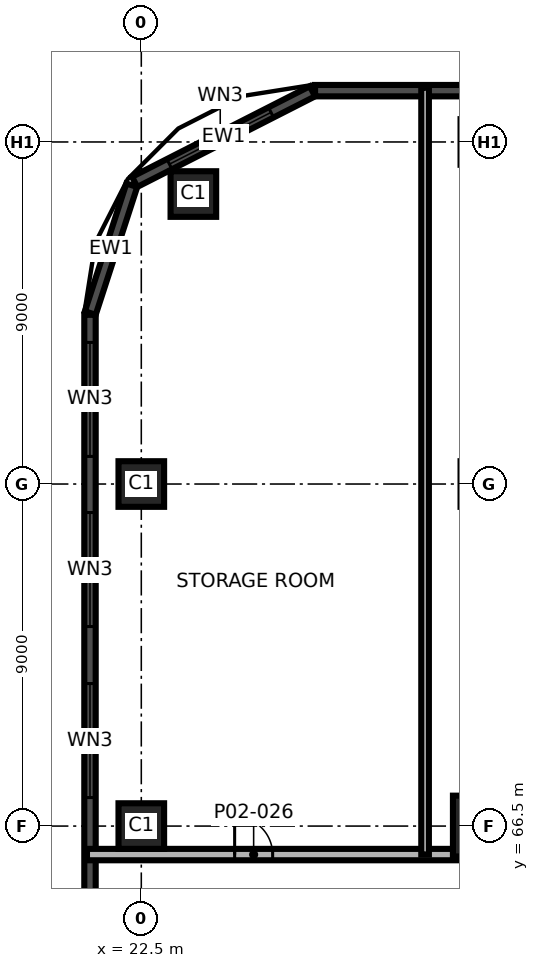
"""IFC4 building model, lengths in metres.
Left out: names, types, materials, properties, quantities, classifications, styles, units other than length and angle.
Written with IfcOpenShell. Run it as: python <this file> out.ifc"""

import sys

from ifc_helpers import new_model, si_unit, direction, frame, frame_2d, origin, origin_2d, place, context, subcontext, project, spatial, rectangle, extrude, element, fill, save


model = new_model("IFC4")
c1 = context("Model", 3, precision=1e-05, world=origin(), true_north=direction((0.0, 1.0)))
c2 = subcontext(c1, "Body", "Model", "MODEL_VIEW")
j1 = project(units=[si_unit("LENGTHUNIT", "METRE"), si_unit("PLANEANGLEUNIT", "RADIAN")], contexts=[c1])
p1 = place(None, origin())
s1 = spatial("IfcSite", under=j1, at=p1, CompositionType="ELEMENT")
p2 = place(p1, origin())
s2 = spatial("IfcBuilding", under=s1, at=p2, CompositionType="ELEMENT")
p3 = place(p2, frame((0.0, 0.0, 13.5)))
s3 = spatial("IfcBuildingStorey", under=s2, at=p3, CompositionType="ELEMENT", Elevation=13.5)
p4 = place(p3, frame((22.5, 66.5, 0.0), z_axis=(0.0, 0.0, 1.0), x_axis=(1.0, 0.0, 0.0)))
e1 = element("IfcColumn", 1, at=p4, inside=s3, PredefinedType="COLUMN", context=c2, shape_type="SweptSolid", body=[
    extrude(rectangle(XDim=1.2, YDim=1.2, at=origin_2d()), origin(), (0.0, 0.0, 1.0), 5.0),
])
p5 = place(p3, frame((31.5, 66.5, 0.0), z_axis=(0.0, 0.0, 1.0), x_axis=(1.0, 0.0, 0.0)))
e2 = element("IfcColumn", 2, at=p5, inside=s3, PredefinedType="COLUMN", context=c2, shape_type="SweptSolid", body=[
    extrude(rectangle(XDim=1.6, YDim=1.6, at=origin_2d()), origin(), (0.0, 0.0, 1.0), 5.0),
])
for number, where, z_axis, x_axis in (
    (3, (22.5, 75.5, 0.0), (0.0, 0.0, 1.0), (1.0, 0.0, 0.0)),
    (4, (23.87, 83.13, 0.0), (0.0, 0.0, 1.0), (1.0, 0.0, 0.0)),
):
    element("IfcColumn", number, at=place(p3, frame(where, z_axis=z_axis, x_axis=x_axis)), inside=s3, PredefinedType="COLUMN", context=c2, shape_type="SweptSolid", body=[
        extrude(rectangle(XDim=1.2, YDim=1.2, at=origin_2d()), origin(), (0.0, 0.0, 1.0), 5.0),
    ])
p6 = place(p3, frame((53.952, 85.85, 0.0), z_axis=(0.0, 0.0, 1.0), x_axis=(-1.0, 0.0, 0.0)))
e5 = element("IfcWall", 5, at=p6, inside=s3, PredefinedType="SOLIDWALL", context=c2, shape_type="SweptSolid", body=[
    extrude(rectangle(XDim=26.88, YDim=0.3, at=frame_2d((13.44, 0.0))), origin(), (0.0, 0.0, 1.0), 4.7),
])
p7 = place(p6, frame((0.726, 0.0, 0.9)))
e6 = element("IfcOpeningElement", 6, at=p7, cuts=e5, PredefinedType="OPENING", context=c2, shape_type="SweptSolid", body=[
    extrude(rectangle(XDim=3.0, YDim=2.4, at=frame_2d((1.5, 1.2))), frame((0.0, 0.16, 0.0), z_axis=(0.0, -1.0, 0.0), x_axis=(1.0, 0.0, 0.0)), (0.0, 0.0, 1.0), 0.32),
])
p8 = place(p6, frame((5.202, 0.0, 0.9)))
e7 = element("IfcOpeningElement", 7, at=p8, cuts=e5, PredefinedType="OPENING", context=c2, shape_type="SweptSolid", body=[
    extrude(rectangle(XDim=3.0, YDim=2.4, at=frame_2d((1.5, 1.2))), frame((0.0, 0.16, 0.0), z_axis=(0.0, -1.0, 0.0), x_axis=(1.0, 0.0, 0.0)), (0.0, 0.0, 1.0), 0.32),
])
p9 = place(p6, frame((9.702, 0.0, 0.9)))
e8 = element("IfcOpeningElement", 8, at=p9, cuts=e5, PredefinedType="OPENING", context=c2, shape_type="SweptSolid", body=[
    extrude(rectangle(XDim=3.0, YDim=2.4, at=frame_2d((1.5, 1.2))), frame((0.0, 0.16, 0.0), z_axis=(0.0, -1.0, 0.0), x_axis=(1.0, 0.0, 0.0)), (0.0, 0.0, 1.0), 0.32),
])
p10 = place(p6, frame((14.202, 0.0, 0.9)))
e9 = element("IfcOpeningElement", 9, at=p10, cuts=e5, PredefinedType="OPENING", context=c2, shape_type="SweptSolid", body=[
    extrude(rectangle(XDim=3.0, YDim=2.4, at=frame_2d((1.5, 1.2))), frame((0.0, 0.16, 0.0), z_axis=(0.0, -1.0, 0.0), x_axis=(1.0, 0.0, 0.0)), (0.0, 0.0, 1.0), 0.32),
])
p11 = place(p6, frame((18.702, 0.0, 0.9)))
e10 = element("IfcOpeningElement", 10, at=p11, cuts=e5, PredefinedType="OPENING", context=c2, shape_type="SweptSolid", body=[
    extrude(rectangle(XDim=3.0, YDim=2.4, at=frame_2d((1.5, 1.2))), frame((0.0, 0.16, 0.0), z_axis=(0.0, -1.0, 0.0), x_axis=(1.0, 0.0, 0.0)), (0.0, 0.0, 1.0), 0.32),
])
p12 = place(p3, frame((27.004, 85.834, 0.0), z_axis=(0.0, 0.0, 1.0), x_axis=(-0.890998339455, -0.454006562826, 0.0)))
e11 = element("IfcWall", 11, at=p12, inside=s3, PredefinedType="SOLIDWALL", context=c2, shape_type="SweptSolid", body=[
    extrude(rectangle(XDim=5.252, YDim=0.3, at=frame_2d((2.626, 0.0))), origin(), (0.0, 0.0, 1.0), 4.7),
])
p13 = place(p12, frame((1.224, 0.0, 0.9)))
e12 = element("IfcOpeningElement", 12, at=p13, cuts=e11, PredefinedType="OPENING", context=c2, shape_type="SweptSolid", body=[
    extrude(rectangle(XDim=3.0, YDim=2.4, at=frame_2d((1.5, 1.2))), frame((0.0, 0.16, 0.0), z_axis=(0.0, -1.0, 0.0), x_axis=(1.0, 0.0, 0.0)), (0.0, 0.0, 1.0), 0.32),
])
p14 = place(p3, frame((22.25, 83.362, 0.0), z_axis=(0.0, 0.0, 1.0), x_axis=(-0.309073584194, -0.951038127287, 0.0)))
e13 = element("IfcWall", 13, at=p14, inside=s3, PredefinedType="SOLIDWALL", context=c2, shape_type="SweptSolid", body=[
    extrude(rectangle(XDim=3.536, YDim=0.3, at=frame_2d((1.768, 0.0))), origin(), (0.0, 0.0, 1.0), 4.7),
])
p15 = place(p3, frame((21.15, 79.952, 0.0), z_axis=(0.0, 0.0, 1.0), x_axis=(0.0, -1.0, 0.0)))
e14 = element("IfcWall", 14, at=p15, inside=s3, PredefinedType="SOLIDWALL", context=c2, shape_type="SweptSolid", body=[
    extrude(rectangle(XDim=62.88, YDim=0.3, at=frame_2d((31.44, 0.0))), origin(), (0.0, 0.0, 1.0), 4.7),
])
p16 = place(p15, frame((0.726, 0.0, 0.9)))
e15 = element("IfcOpeningElement", 15, at=p16, cuts=e14, PredefinedType="OPENING", context=c2, shape_type="SweptSolid", body=[
    extrude(rectangle(XDim=3.0, YDim=2.4, at=frame_2d((1.5, 1.2))), frame((0.0, 0.16, 0.0), z_axis=(0.0, -1.0, 0.0), x_axis=(1.0, 0.0, 0.0)), (0.0, 0.0, 1.0), 0.32),
])
p17 = place(p15, frame((5.202, 0.0, 0.9)))
e16 = element("IfcOpeningElement", 16, at=p17, cuts=e14, PredefinedType="OPENING", context=c2, shape_type="SweptSolid", body=[
    extrude(rectangle(XDim=3.0, YDim=2.4, at=frame_2d((1.5, 1.2))), frame((0.0, 0.16, 0.0), z_axis=(0.0, -1.0, 0.0), x_axis=(1.0, 0.0, 0.0)), (0.0, 0.0, 1.0), 0.32),
])
p18 = place(p15, frame((9.702, 0.0, 0.9)))
e17 = element("IfcOpeningElement", 17, at=p18, cuts=e14, PredefinedType="OPENING", context=c2, shape_type="SweptSolid", body=[
    extrude(rectangle(XDim=3.0, YDim=2.4, at=frame_2d((1.5, 1.2))), frame((0.0, 0.16, 0.0), z_axis=(0.0, -1.0, 0.0), x_axis=(1.0, 0.0, 0.0)), (0.0, 0.0, 1.0), 0.32),
])
p19 = place(p15, frame((18.702, 0.0, 0.9)))
e18 = element("IfcOpeningElement", 18, at=p19, cuts=e14, PredefinedType="OPENING", context=c2, shape_type="SweptSolid", body=[
    extrude(rectangle(XDim=3.0, YDim=2.4, at=frame_2d((1.5, 1.2))), frame((0.0, 0.16, 0.0), z_axis=(0.0, -1.0, 0.0), x_axis=(1.0, 0.0, 0.0)), (0.0, 0.0, 1.0), 0.32),
])
p20 = place(p15, frame((27.702, 0.0, 0.9)))
e19 = element("IfcOpeningElement", 19, at=p20, cuts=e14, PredefinedType="OPENING", context=c2, shape_type="SweptSolid", body=[
    extrude(rectangle(XDim=3.0, YDim=2.4, at=frame_2d((1.5, 1.2))), frame((0.0, 0.16, 0.0), z_axis=(0.0, -1.0, 0.0), x_axis=(1.0, 0.0, 0.0)), (0.0, 0.0, 1.0), 0.32),
])
p21 = place(p15, frame((32.202, 0.0, 0.9)))
e20 = element("IfcOpeningElement", 20, at=p21, cuts=e14, PredefinedType="OPENING", context=c2, shape_type="SweptSolid", body=[
    extrude(rectangle(XDim=3.0, YDim=2.4, at=frame_2d((1.5, 1.2))), frame((0.0, 0.16, 0.0), z_axis=(0.0, -1.0, 0.0), x_axis=(1.0, 0.0, 0.0)), (0.0, 0.0, 1.0), 0.32),
])
p22 = place(p15, frame((41.202, 0.0, 0.9)))
e21 = element("IfcOpeningElement", 21, at=p22, cuts=e14, PredefinedType="OPENING", context=c2, shape_type="SweptSolid", body=[
    extrude(rectangle(XDim=3.0, YDim=2.4, at=frame_2d((1.5, 1.2))), frame((0.0, 0.16, 0.0), z_axis=(0.0, -1.0, 0.0), x_axis=(1.0, 0.0, 0.0)), (0.0, 0.0, 1.0), 0.32),
])
p23 = place(p15, frame((45.702, 0.0, 0.9)))
e22 = element("IfcOpeningElement", 22, at=p23, cuts=e14, PredefinedType="OPENING", context=c2, shape_type="SweptSolid", body=[
    extrude(rectangle(XDim=3.0, YDim=2.4, at=frame_2d((1.5, 1.2))), frame((0.0, 0.16, 0.0), z_axis=(0.0, -1.0, 0.0), x_axis=(1.0, 0.0, 0.0)), (0.0, 0.0, 1.0), 0.32),
])
p24 = place(p15, frame((50.202, 0.0, 0.9)))
e23 = element("IfcOpeningElement", 23, at=p24, cuts=e14, PredefinedType="OPENING", context=c2, shape_type="SweptSolid", body=[
    extrude(rectangle(XDim=3.0, YDim=2.4, at=frame_2d((1.5, 1.2))), frame((0.0, 0.16, 0.0), z_axis=(0.0, -1.0, 0.0), x_axis=(1.0, 0.0, 0.0)), (0.0, 0.0, 1.0), 0.32),
])
p25 = place(p15, frame((54.702, 0.0, 0.9)))
e24 = element("IfcOpeningElement", 24, at=p25, cuts=e14, PredefinedType="OPENING", context=c2, shape_type="SweptSolid", body=[
    extrude(rectangle(XDim=3.0, YDim=2.4, at=frame_2d((1.5, 1.2))), frame((0.0, 0.16, 0.0), z_axis=(0.0, -1.0, 0.0), x_axis=(1.0, 0.0, 0.0)), (0.0, 0.0, 1.0), 0.32),
])
p26 = place(p15, frame((59.226, 0.0, 0.9)))
e25 = element("IfcOpeningElement", 25, at=p26, cuts=e14, PredefinedType="OPENING", context=c2, shape_type="SweptSolid", body=[
    extrude(rectangle(XDim=3.0, YDim=2.4, at=frame_2d((1.5, 1.2))), frame((0.0, 0.16, 0.0), z_axis=(0.0, -1.0, 0.0), x_axis=(1.0, 0.0, 0.0)), (0.0, 0.0, 1.0), 0.32),
])
p27 = place(p3, frame((21.07, 65.75, 0.0), z_axis=(0.0, 0.0, 1.0), x_axis=(1.0, 0.0, 0.0)))
e26 = element("IfcWall", 26, at=p27, inside=s3, PredefinedType="SHEAR", context=c2, shape_type="SweptSolid", body=[
    extrude(rectangle(XDim=38.86, YDim=0.3, at=frame_2d((19.43, 0.0))), origin(), (0.0, 0.0, 1.0), 4.7),
])
p28 = place(p27, frame((20.68, 0.0, 0.0)))
e27 = element("IfcOpeningElement", 27, at=p28, cuts=e26, PredefinedType="OPENING", context=c2, shape_type="SweptSolid", body=[
    extrude(rectangle(XDim=1.2, YDim=2.1, at=frame_2d((0.6, 1.05))), frame((0.0, 0.16, 0.0), z_axis=(0.0, -1.0, 0.0), x_axis=(1.0, 0.0, 0.0)), (0.0, 0.0, 1.0), 0.32),
])
p29 = place(p27, frame((12.86, 0.0, 0.0)))
e28 = element("IfcOpeningElement", 28, at=p29, cuts=e26, PredefinedType="OPENING", context=c2, shape_type="SweptSolid", body=[
    extrude(rectangle(XDim=1.0, YDim=2.1, at=frame_2d((0.5, 1.05))), frame((0.0, 0.16, 0.0), z_axis=(0.0, -1.0, 0.0), x_axis=(1.0, 0.0, 0.0)), (0.0, 0.0, 1.0), 0.32),
])
p30 = place(p27, frame((25.431, 0.0, 0.0)))
e29 = element("IfcOpeningElement", 29, at=p30, cuts=e26, PredefinedType="OPENING", context=c2, shape_type="SweptSolid", body=[
    extrude(rectangle(XDim=1.0, YDim=2.1, at=frame_2d((0.5, 1.05))), frame((0.0, 0.16, 0.0), z_axis=(0.0, -1.0, 0.0), x_axis=(1.0, 0.0, 0.0)), (0.0, 0.0, 1.0), 0.32),
])
p31 = place(p27, frame((3.886, 0.0, 0.0)))
e30 = element("IfcOpeningElement", 30, at=p31, cuts=e26, PredefinedType="OPENING", context=c2, shape_type="SweptSolid", body=[
    extrude(rectangle(XDim=1.0, YDim=2.1, at=frame_2d((0.5, 1.05))), frame((0.0, 0.16, 0.0), z_axis=(0.0, -1.0, 0.0), x_axis=(1.0, 0.0, 0.0)), (0.0, 0.0, 1.0), 0.32),
])
p32 = place(p27, frame((29.965, 0.0, 0.0)))
e31 = element("IfcOpeningElement", 31, at=p32, cuts=e26, PredefinedType="OPENING", context=c2, shape_type="SweptSolid", body=[
    extrude(rectangle(XDim=1.0, YDim=2.1, at=frame_2d((0.5, 1.05))), frame((0.0, 0.16, 0.0), z_axis=(0.0, -1.0, 0.0), x_axis=(1.0, 0.0, 0.0)), (0.0, 0.0, 1.0), 0.32),
])
p33 = place(p27, frame((35.175, 0.0, 0.0)))
e32 = element("IfcOpeningElement", 32, at=p33, cuts=e26, PredefinedType="OPENING", context=c2, shape_type="SweptSolid", body=[
    extrude(rectangle(XDim=1.0, YDim=2.1, at=frame_2d((0.5, 1.05))), frame((0.0, 0.16, 0.0), z_axis=(0.0, -1.0, 0.0), x_axis=(1.0, 0.0, 0.0)), (0.0, 0.0, 1.0), 0.32),
])
p34 = place(p3, frame((29.967, 65.75, 0.0), z_axis=(0.0, 0.0, 1.0), x_axis=(0.0, 1.0, 0.0)))
e33 = element("IfcWall", 33, at=p34, inside=s3, PredefinedType="PARTITIONING", context=c2, shape_type="SweptSolid", body=[
    extrude(rectangle(XDim=20.18, YDim=0.2, at=frame_2d((10.09, 0.0))), origin(), (0.0, 0.0, 1.0), 4.7),
])
p35 = place(p13, origin())
e34 = element("IfcWindow", 34, at=p35, inside=s3, PartitioningType="SINGLE_PANEL", PredefinedType="WINDOW", context=c2, shape_type="SweptSolid", body=[
    extrude(rectangle(XDim=3.0, YDim=2.4, at=frame_2d((1.5, 1.2))), frame((0.0, 0.03, 0.0), z_axis=(0.0, -1.0, 0.0), x_axis=(1.0, 0.0, 0.0)), (0.0, 0.0, 1.0), 0.06),
])
fill(e12, e34)
p36 = place(p16, origin())
e35 = element("IfcWindow", 35, at=p36, inside=s3, PartitioningType="SINGLE_PANEL", PredefinedType="WINDOW", context=c2, shape_type="SweptSolid", body=[
    extrude(rectangle(XDim=3.0, YDim=2.4, at=frame_2d((1.5, 1.2))), frame((0.0, 0.03, 0.0), z_axis=(0.0, -1.0, 0.0), x_axis=(1.0, 0.0, 0.0)), (0.0, 0.0, 1.0), 0.06),
])
fill(e15, e35)
p37 = place(p17, origin())
e36 = element("IfcWindow", 36, at=p37, inside=s3, PartitioningType="SINGLE_PANEL", PredefinedType="WINDOW", context=c2, shape_type="SweptSolid", body=[
    extrude(rectangle(XDim=3.0, YDim=2.4, at=frame_2d((1.5, 1.2))), frame((0.0, 0.03, 0.0), z_axis=(0.0, -1.0, 0.0), x_axis=(1.0, 0.0, 0.0)), (0.0, 0.0, 1.0), 0.06),
])
fill(e16, e36)
p38 = place(p18, origin())
e37 = element("IfcWindow", 37, at=p38, inside=s3, PartitioningType="SINGLE_PANEL", PredefinedType="WINDOW", context=c2, shape_type="SweptSolid", body=[
    extrude(rectangle(XDim=3.0, YDim=2.4, at=frame_2d((1.5, 1.2))), frame((0.0, 0.03, 0.0), z_axis=(0.0, -1.0, 0.0), x_axis=(1.0, 0.0, 0.0)), (0.0, 0.0, 1.0), 0.06),
])
fill(e17, e37)
p39 = place(p31, origin())
e38 = element("IfcDoor", 38, at=p39, inside=s3, OperationType="SINGLE_SWING_RIGHT", PredefinedType="DOOR", context=c2, shape_type="SweptSolid", body=[
    extrude(rectangle(XDim=1.0, YDim=2.1, at=frame_2d((0.5, 1.05))), frame((0.0, 0.025, 0.0), z_axis=(0.0, -1.0, 0.0), x_axis=(1.0, 0.0, 0.0)), (0.0, 0.0, 1.0), 0.05),
])
fill(e30, e38)
save(model, sys.argv[1])
